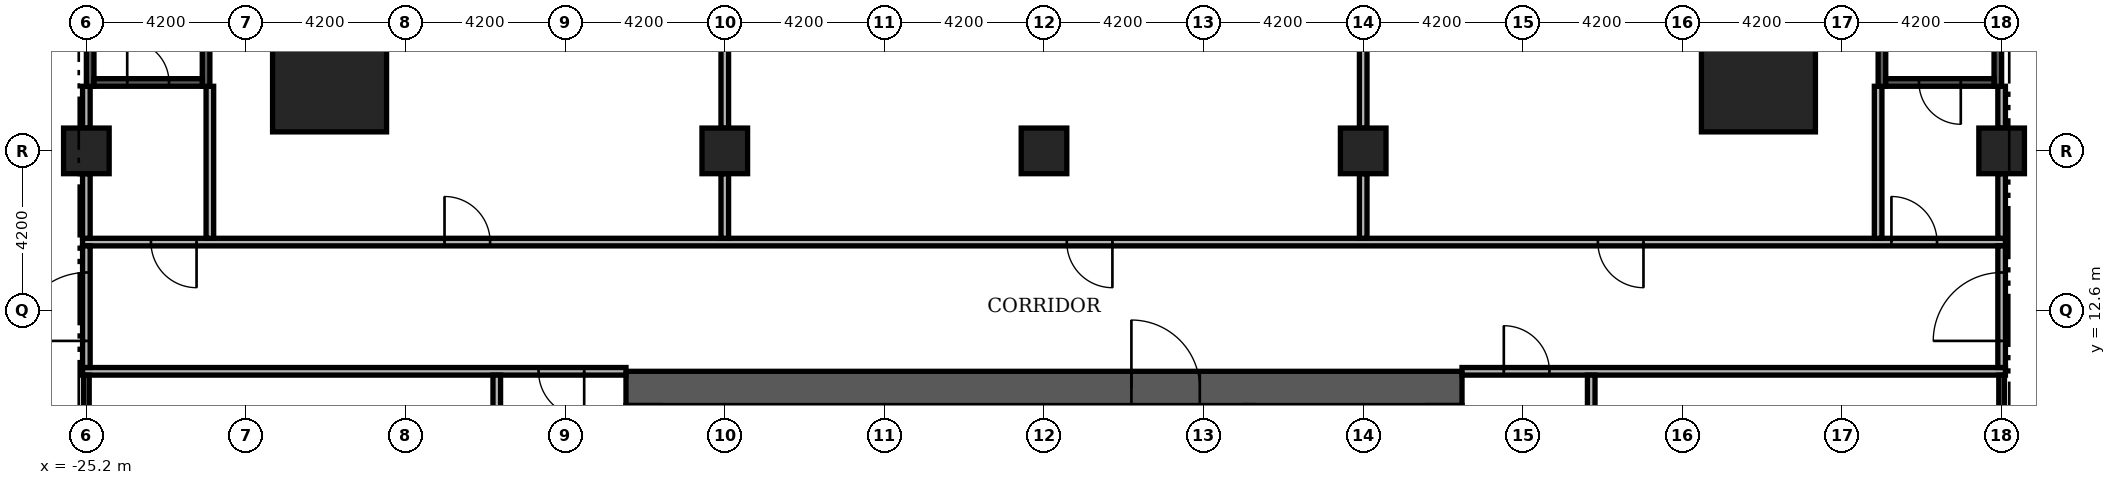
"""IFC4 building model, lengths in metres.
Left out: names, types, materials, properties, quantities, classifications, styles, units other than length and angle.
Written with IfcOpenShell. Run it as: python <this file> out.ifc"""

import sys

from ifc_helpers import new_model, si_unit, direction, frame, frame_2d, origin, origin_2d, place, context, subcontext, project, spatial, rectangle, extrude, element, fill, save


model = new_model("IFC4")
c1 = context("Model", 3, precision=1e-05, world=origin(), true_north=direction((0.0, 1.0)))
c2 = subcontext(c1, "Body", "Model", "MODEL_VIEW")
j1 = project(units=[si_unit("LENGTHUNIT", "METRE"), si_unit("PLANEANGLEUNIT", "RADIAN")], contexts=[c1])
p1 = place(None, origin())
s1 = spatial("IfcSite", under=j1, at=p1, CompositionType="ELEMENT")
p2 = place(p1, origin())
s2 = spatial("IfcBuilding", under=s1, at=p2, CompositionType="ELEMENT")
p3 = place(p2, frame((0.0, 0.0, -8.4)))
s3 = spatial("IfcBuildingStorey", under=s2, at=p3, CompositionType="ELEMENT", Elevation=-8.4)
p4 = place(p3, frame((-11.0, 10.55, 0.0), z_axis=(0.0, 0.0, 1.0), x_axis=(1.0, 0.0, 0.0)))
e1 = element("IfcWall", 1, at=p4, inside=s3, PredefinedType="SHEAR", context=c2, shape_type="SweptSolid", body=[
    extrude(rectangle(XDim=22.0, YDim=0.9, at=frame_2d((11.0, 0.0))), origin(), (0.0, 0.0, 1.0), 3.85),
])
p5 = place(p4, frame((13.3, 0.0, 0.0)))
e2 = element("IfcOpeningElement", 2, at=p5, cuts=e1, PredefinedType="OPENING", context=c2, shape_type="SweptSolid", body=[
    extrude(rectangle(XDim=1.8, YDim=2.2, at=frame_2d((0.9, 1.1))), frame((0.0, 0.46, 0.0), z_axis=(0.0, -1.0, 0.0), x_axis=(1.0, 0.0, 0.0)), (0.0, 0.0, 1.0), 0.92),
])
for number, where, z_axis, x_axis in (
    (3, (18.8, 18.8, 0.0), (0.0, 0.0, 1.0), (1.0, 0.0, 0.0)),
    (4, (-18.8, 18.8, 0.0), (0.0, 0.0, 1.0), (1.0, 0.0, 0.0)),
):
    element("IfcColumn", number, at=place(p3, frame(where, z_axis=z_axis, x_axis=x_axis)), inside=s3, PredefinedType="COLUMN", context=c2, shape_type="SweptSolid", body=[
        extrude(rectangle(XDim=3.0, YDim=3.0, at=origin_2d()), origin(), (0.0, 0.0, 1.0), 4.2),
    ])
for number, where, z_axis, x_axis in (
    (5, (25.2, 16.8, 0.0), (0.0, 0.0, 1.0), (1.0, 0.0, 0.0)),
    (6, (-25.2, 16.8, 0.0), (0.0, 0.0, 1.0), (1.0, 0.0, 0.0)),
    (7, (0.0, 16.8, 0.0), (0.0, 0.0, 1.0), (1.0, 0.0, 0.0)),
    (8, (8.4, 16.8, 0.0), (0.0, 0.0, 1.0), (1.0, 0.0, 0.0)),
    (9, (-8.4, 16.8, 0.0), (0.0, 0.0, 1.0), (1.0, 0.0, 0.0)),
):
    element("IfcColumn", number, at=place(p3, frame(where, z_axis=z_axis, x_axis=x_axis)), inside=s3, PredefinedType="COLUMN", context=c2, shape_type="SweptSolid", body=[
        extrude(rectangle(XDim=1.2, YDim=1.2, at=origin_2d()), origin(), (0.0, 0.0, 1.0), 4.2),
    ])
p6 = place(p3, frame((-25.3, 11.0, 0.0), z_axis=(0.0, 0.0, 1.0), x_axis=(1.0, 0.0, 0.0)))
e10 = element("IfcWall", 10, at=p6, inside=s3, PredefinedType="PARTITIONING", context=c2, shape_type="SweptSolid", body=[
    extrude(rectangle(XDim=14.3, YDim=0.2, at=frame_2d((7.15, 0.0))), origin(), (0.0, 0.0, 1.0), 3.85),
])
p7 = place(p6, frame((12.0, 0.0, 0.0)))
e11 = element("IfcOpeningElement", 11, at=p7, cuts=e10, PredefinedType="OPENING", context=c2, shape_type="SweptSolid", body=[
    extrude(rectangle(XDim=1.2, YDim=2.2, at=frame_2d((0.6, 1.1))), frame((0.0, 0.11, 0.0), z_axis=(0.0, -1.0, 0.0), x_axis=(1.0, 0.0, 0.0)), (0.0, 0.0, 1.0), 0.22),
])
p8 = place(p3, frame((11.0, 11.0, 0.0), z_axis=(0.0, 0.0, 1.0), x_axis=(1.0, 0.0, 0.0)))
e12 = element("IfcWall", 12, at=p8, inside=s3, PredefinedType="PARTITIONING", context=c2, shape_type="SweptSolid", body=[
    extrude(rectangle(XDim=14.3, YDim=0.2, at=frame_2d((7.15, 0.0))), origin(), (0.0, 0.0, 1.0), 3.85),
])
p9 = place(p8, frame((1.1, 0.0, 0.0)))
e13 = element("IfcOpeningElement", 13, at=p9, cuts=e12, PredefinedType="OPENING", context=c2, shape_type="SweptSolid", body=[
    extrude(rectangle(XDim=1.2, YDim=2.2, at=frame_2d((0.6, 1.1))), frame((0.0, 0.11, 0.0), z_axis=(0.0, -1.0, 0.0), x_axis=(1.0, 0.0, 0.0)), (0.0, 0.0, 1.0), 0.22),
])
p10 = place(p3, frame((-25.3, 14.4, 0.0), z_axis=(0.0, 0.0, 1.0), x_axis=(1.0, 0.0, 0.0)))
e14 = element("IfcWall", 14, at=p10, inside=s3, PredefinedType="PARTITIONING", context=c2, shape_type="SweptSolid", body=[
    extrude(rectangle(XDim=50.6, YDim=0.2, at=frame_2d((25.3, 0.0))), origin(), (0.0, 0.0, 1.0), 3.85),
])
p11 = place(p10, frame((1.8, 0.0, 0.0)))
e15 = element("IfcOpeningElement", 15, at=p11, cuts=e14, PredefinedType="OPENING", context=c2, shape_type="SweptSolid", body=[
    extrude(rectangle(XDim=1.2, YDim=2.2, at=frame_2d((0.6, 1.1))), frame((0.0, 0.11, 0.0), z_axis=(0.0, -1.0, 0.0), x_axis=(1.0, 0.0, 0.0)), (0.0, 0.0, 1.0), 0.22),
])
p12 = place(p10, frame((9.525, 0.0, 0.0)))
e16 = element("IfcOpeningElement", 16, at=p12, cuts=e14, PredefinedType="OPENING", context=c2, shape_type="SweptSolid", body=[
    extrude(rectangle(XDim=1.2, YDim=2.2, at=frame_2d((0.6, 1.1))), frame((0.0, 0.11, 0.0), z_axis=(0.0, -1.0, 0.0), x_axis=(1.0, 0.0, 0.0)), (0.0, 0.0, 1.0), 0.22),
])
p13 = place(p10, frame((25.9, 0.0, 0.0)))
e17 = element("IfcOpeningElement", 17, at=p13, cuts=e14, PredefinedType="OPENING", context=c2, shape_type="SweptSolid", body=[
    extrude(rectangle(XDim=1.2, YDim=2.2, at=frame_2d((0.6, 1.1))), frame((0.0, 0.11, 0.0), z_axis=(0.0, -1.0, 0.0), x_axis=(1.0, 0.0, 0.0)), (0.0, 0.0, 1.0), 0.22),
])
p14 = place(p10, frame((39.875, 0.0, 0.0)))
e18 = element("IfcOpeningElement", 18, at=p14, cuts=e14, PredefinedType="OPENING", context=c2, shape_type="SweptSolid", body=[
    extrude(rectangle(XDim=1.2, YDim=2.2, at=frame_2d((0.6, 1.1))), frame((0.0, 0.11, 0.0), z_axis=(0.0, -1.0, 0.0), x_axis=(1.0, 0.0, 0.0)), (0.0, 0.0, 1.0), 0.22),
])
p15 = place(p10, frame((47.6, 0.0, 0.0)))
e19 = element("IfcOpeningElement", 19, at=p15, cuts=e14, PredefinedType="OPENING", context=c2, shape_type="SweptSolid", body=[
    extrude(rectangle(XDim=1.2, YDim=2.2, at=frame_2d((0.6, 1.1))), frame((0.0, 0.11, 0.0), z_axis=(0.0, -1.0, 0.0), x_axis=(1.0, 0.0, 0.0)), (0.0, 0.0, 1.0), 0.22),
])
p16 = place(p3, frame((-25.2, 9.0, 0.0), z_axis=(0.0, 0.0, 1.0), x_axis=(0.0, 1.0, 0.0)))
e20 = element("IfcWall", 20, at=p16, inside=s3, PredefinedType="PARTITIONING", context=c2, shape_type="SweptSolid", body=[
    extrude(rectangle(XDim=1.9, YDim=0.15, at=frame_2d((0.95, 0.0))), origin(), (0.0, 0.0, 1.0), 3.85),
])
p17 = place(p3, frame((-25.2, 11.1, 0.0), z_axis=(0.0, 0.0, 1.0), x_axis=(0.0, 1.0, 0.0)))
e21 = element("IfcWall", 21, at=p17, inside=s3, PredefinedType="PARTITIONING", context=c2, shape_type="SweptSolid", body=[
    extrude(rectangle(XDim=3.2, YDim=0.2, at=frame_2d((1.6, 0.0))), origin(), (0.0, 0.0, 1.0), 3.85),
])
p18 = place(p17, frame((0.7, 0.0, 0.0)))
e22 = element("IfcOpeningElement", 22, at=p18, cuts=e21, PredefinedType="OPENING", context=c2, shape_type="SweptSolid", body=[
    extrude(rectangle(XDim=1.8, YDim=2.2, at=frame_2d((0.9, 1.1))), frame((0.0, 0.11, 0.0), z_axis=(0.0, -1.0, 0.0), x_axis=(1.0, 0.0, 0.0)), (0.0, 0.0, 1.0), 0.22),
])
p19 = place(p3, frame((-25.2, 14.5, 0.0), z_axis=(0.0, 0.0, 1.0), x_axis=(0.0, 1.0, 0.0)))
e23 = element("IfcWall", 23, at=p19, inside=s3, PredefinedType="PARTITIONING", context=c2, shape_type="SweptSolid", body=[
    extrude(rectangle(XDim=1.7, YDim=0.2, at=frame_2d((0.85, 0.0))), origin(), (0.0, 0.0, 1.0), 3.85),
])
p20 = place(p3, frame((-25.2, 17.4, 0.0), z_axis=(0.0, 0.0, 1.0), x_axis=(0.0, 1.0, 0.0)))
e24 = element("IfcWall", 24, at=p20, inside=s3, PredefinedType="PARTITIONING", context=c2, shape_type="SweptSolid", body=[
    extrude(rectangle(XDim=1.1, YDim=0.2, at=frame_2d((0.55, 0.0))), origin(), (0.0, 0.0, 1.0), 3.85),
])
p21 = place(p3, frame((-21.95, 14.5, 0.0), z_axis=(0.0, 0.0, 1.0), x_axis=(0.0, 1.0, 0.0)))
e25 = element("IfcWall", 25, at=p21, inside=s3, PredefinedType="PARTITIONING", context=c2, shape_type="SweptSolid", body=[
    extrude(rectangle(XDim=4.0, YDim=0.2, at=frame_2d((2.0, 0.0))), origin(), (0.0, 0.0, 1.0), 3.85),
])
p22 = place(p3, frame((-14.4, -10.9, 0.0), z_axis=(0.0, 0.0, 1.0), x_axis=(0.0, 1.0, 0.0)))
e26 = element("IfcWall", 26, at=p22, inside=s3, PredefinedType="PARTITIONING", context=c2, shape_type="SweptSolid", body=[
    extrude(rectangle(XDim=21.8, YDim=0.2, at=frame_2d((10.9, 0.0))), origin(), (0.0, 0.0, 1.0), 3.85),
])
p23 = place(p22, frame((4.8, 0.0, 0.0)))
e27 = element("IfcOpeningElement", 27, at=p23, cuts=e26, PredefinedType="OPENING", context=c2, shape_type="SweptSolid", body=[
    extrude(rectangle(XDim=1.2, YDim=2.2, at=frame_2d((0.6, 1.1))), frame((0.0, 0.11, 0.0), z_axis=(0.0, -1.0, 0.0), x_axis=(1.0, 0.0, 0.0)), (0.0, 0.0, 1.0), 0.22),
])
p24 = place(p22, frame((15.8, 0.0, 0.0)))
e28 = element("IfcOpeningElement", 28, at=p24, cuts=e26, PredefinedType="OPENING", context=c2, shape_type="SweptSolid", body=[
    extrude(rectangle(XDim=1.2, YDim=2.2, at=frame_2d((0.6, 1.1))), frame((0.0, 0.11, 0.0), z_axis=(0.0, -1.0, 0.0), x_axis=(1.0, 0.0, 0.0)), (0.0, 0.0, 1.0), 0.22),
])
p25 = place(p3, frame((-8.4, 14.5, 0.0), z_axis=(0.0, 0.0, 1.0), x_axis=(0.0, 1.0, 0.0)))
e29 = element("IfcWall", 29, at=p25, inside=s3, PredefinedType="PARTITIONING", context=c2, shape_type="SweptSolid", body=[
    extrude(rectangle(XDim=1.7, YDim=0.2, at=frame_2d((0.85, 0.0))), origin(), (0.0, 0.0, 1.0), 3.85),
])
p26 = place(p3, frame((-8.4, 17.4, 0.0), z_axis=(0.0, 0.0, 1.0), x_axis=(0.0, 1.0, 0.0)))
e30 = element("IfcWall", 30, at=p26, inside=s3, PredefinedType="PARTITIONING", context=c2, shape_type="SweptSolid", body=[
    extrude(rectangle(XDim=7.2, YDim=0.2, at=frame_2d((3.6, 0.0))), origin(), (0.0, 0.0, 1.0), 3.85),
])
p27 = place(p3, frame((8.4, 14.5, 0.0), z_axis=(0.0, 0.0, 1.0), x_axis=(0.0, 1.0, 0.0)))
e31 = element("IfcWall", 31, at=p27, inside=s3, PredefinedType="PARTITIONING", context=c2, shape_type="SweptSolid", body=[
    extrude(rectangle(XDim=1.7, YDim=0.2, at=frame_2d((0.85, 0.0))), origin(), (0.0, 0.0, 1.0), 3.85),
])
p28 = place(p3, frame((8.4, 17.4, 0.0), z_axis=(0.0, 0.0, 1.0), x_axis=(0.0, 1.0, 0.0)))
e32 = element("IfcWall", 32, at=p28, inside=s3, PredefinedType="PARTITIONING", context=c2, shape_type="SweptSolid", body=[
    extrude(rectangle(XDim=7.2, YDim=0.2, at=frame_2d((3.6, 0.0))), origin(), (0.0, 0.0, 1.0), 3.85),
])
p29 = place(p3, frame((14.4, -10.9, 0.0), z_axis=(0.0, 0.0, 1.0), x_axis=(0.0, 1.0, 0.0)))
e33 = element("IfcWall", 33, at=p29, inside=s3, PredefinedType="PARTITIONING", context=c2, shape_type="SweptSolid", body=[
    extrude(rectangle(XDim=21.8, YDim=0.2, at=frame_2d((10.9, 0.0))), origin(), (0.0, 0.0, 1.0), 3.85),
])
p30 = place(p29, frame((4.8, 0.0, 0.0)))
e34 = element("IfcOpeningElement", 34, at=p30, cuts=e33, PredefinedType="OPENING", context=c2, shape_type="SweptSolid", body=[
    extrude(rectangle(XDim=1.2, YDim=2.2, at=frame_2d((0.6, 1.1))), frame((0.0, 0.11, 0.0), z_axis=(0.0, -1.0, 0.0), x_axis=(1.0, 0.0, 0.0)), (0.0, 0.0, 1.0), 0.22),
])
p31 = place(p29, frame((15.8, 0.0, 0.0)))
e35 = element("IfcOpeningElement", 35, at=p31, cuts=e33, PredefinedType="OPENING", context=c2, shape_type="SweptSolid", body=[
    extrude(rectangle(XDim=1.2, YDim=2.2, at=frame_2d((0.6, 1.1))), frame((0.0, 0.11, 0.0), z_axis=(0.0, -1.0, 0.0), x_axis=(1.0, 0.0, 0.0)), (0.0, 0.0, 1.0), 0.22),
])
p32 = place(p3, frame((21.95, 14.5, 0.0), z_axis=(0.0, 0.0, 1.0), x_axis=(0.0, 1.0, 0.0)))
e36 = element("IfcWall", 36, at=p32, inside=s3, PredefinedType="PARTITIONING", context=c2, shape_type="SweptSolid", body=[
    extrude(rectangle(XDim=4.0, YDim=0.2, at=frame_2d((2.0, 0.0))), origin(), (0.0, 0.0, 1.0), 3.85),
])
p33 = place(p3, frame((25.2, 9.0, 0.0), z_axis=(0.0, 0.0, 1.0), x_axis=(0.0, 1.0, 0.0)))
e37 = element("IfcWall", 37, at=p33, inside=s3, PredefinedType="PARTITIONING", context=c2, shape_type="SweptSolid", body=[
    extrude(rectangle(XDim=1.9, YDim=0.15, at=frame_2d((0.95, 0.0))), origin(), (0.0, 0.0, 1.0), 3.85),
])
p34 = place(p3, frame((25.2, 11.1, 0.0), z_axis=(0.0, 0.0, 1.0), x_axis=(0.0, 1.0, 0.0)))
e38 = element("IfcWall", 38, at=p34, inside=s3, PredefinedType="PARTITIONING", context=c2, shape_type="SweptSolid", body=[
    extrude(rectangle(XDim=3.2, YDim=0.2, at=frame_2d((1.6, 0.0))), origin(), (0.0, 0.0, 1.0), 3.85),
])
p35 = place(p34, frame((0.7, 0.0, 0.0)))
e39 = element("IfcOpeningElement", 39, at=p35, cuts=e38, PredefinedType="OPENING", context=c2, shape_type="SweptSolid", body=[
    extrude(rectangle(XDim=1.8, YDim=2.2, at=frame_2d((0.9, 1.1))), frame((0.0, 0.11, 0.0), z_axis=(0.0, -1.0, 0.0), x_axis=(1.0, 0.0, 0.0)), (0.0, 0.0, 1.0), 0.22),
])
p36 = place(p3, frame((25.2, 14.5, 0.0), z_axis=(0.0, 0.0, 1.0), x_axis=(0.0, 1.0, 0.0)))
e40 = element("IfcWall", 40, at=p36, inside=s3, PredefinedType="PARTITIONING", context=c2, shape_type="SweptSolid", body=[
    extrude(rectangle(XDim=1.7, YDim=0.2, at=frame_2d((0.85, 0.0))), origin(), (0.0, 0.0, 1.0), 3.85),
])
p37 = place(p3, frame((25.2, 17.4, 0.0), z_axis=(0.0, 0.0, 1.0), x_axis=(0.0, 1.0, 0.0)))
e41 = element("IfcWall", 41, at=p37, inside=s3, PredefinedType="PARTITIONING", context=c2, shape_type="SweptSolid", body=[
    extrude(rectangle(XDim=1.1, YDim=0.2, at=frame_2d((0.55, 0.0))), origin(), (0.0, 0.0, 1.0), 3.85),
])
p38 = place(p3, frame((22.05, 18.5, 0.0), z_axis=(0.0, 0.0, 1.0), x_axis=(0.0, 1.0, 0.0)))
e42 = element("IfcWall", 42, at=p38, inside=s3, PredefinedType="SOLIDWALL", context=c2, shape_type="SweptSolid", body=[
    extrude(rectangle(XDim=6.74, YDim=0.2, at=frame_2d((3.37, 0.0))), origin(), (0.0, 0.0, 1.0), 3.85),
])
p39 = place(p3, frame((25.1, 18.5, 0.0), z_axis=(0.0, 0.0, 1.0), x_axis=(0.0, 1.0, 0.0)))
e43 = element("IfcWall", 43, at=p39, inside=s3, PredefinedType="SOLIDWALL", context=c2, shape_type="SweptSolid", body=[
    extrude(rectangle(XDim=6.1, YDim=0.2, at=frame_2d((3.05, 0.0))), origin(), (0.0, 0.0, 1.0), 3.85),
])
p40 = place(p3, frame((22.15, 18.6, 0.0), z_axis=(0.0, 0.0, 1.0), x_axis=(1.0, 0.0, 0.0)))
e44 = element("IfcWall", 44, at=p40, inside=s3, PredefinedType="SOLIDWALL", context=c2, shape_type="SweptSolid", body=[
    extrude(rectangle(XDim=2.85, YDim=0.2, at=frame_2d((1.425, 0.0))), origin(), (0.0, 0.0, 1.0), 3.85),
])
p41 = place(p40, frame((0.875, 0.0, 0.0)))
e45 = element("IfcOpeningElement", 45, at=p41, cuts=e44, PredefinedType="OPENING", context=c2, shape_type="SweptSolid", body=[
    extrude(rectangle(XDim=1.1, YDim=2.2, at=frame_2d((0.55, 1.1))), frame((0.0, 0.11, 0.0), z_axis=(0.0, -1.0, 0.0), x_axis=(1.0, 0.0, 0.0)), (0.0, 0.0, 1.0), 0.22),
])
p42 = place(p3, frame((-25.1, 18.5, 0.0), z_axis=(0.0, 0.0, 1.0), x_axis=(0.0, 1.0, 0.0)))
e46 = element("IfcWall", 46, at=p42, inside=s3, PredefinedType="SOLIDWALL", context=c2, shape_type="SweptSolid", body=[
    extrude(rectangle(XDim=6.1, YDim=0.2, at=frame_2d((3.05, 0.0))), origin(), (0.0, 0.0, 1.0), 3.85),
])
p43 = place(p3, frame((-22.05, 18.5, 0.0), z_axis=(0.0, 0.0, 1.0), x_axis=(0.0, 1.0, 0.0)))
e47 = element("IfcWall", 47, at=p43, inside=s3, PredefinedType="SOLIDWALL", context=c2, shape_type="SweptSolid", body=[
    extrude(rectangle(XDim=6.74, YDim=0.2, at=frame_2d((3.37, 0.0))), origin(), (0.0, 0.0, 1.0), 3.85),
])
p44 = place(p3, frame((-25.0, 18.6, 0.0), z_axis=(0.0, 0.0, 1.0), x_axis=(1.0, 0.0, 0.0)))
e48 = element("IfcWall", 48, at=p44, inside=s3, PredefinedType="SOLIDWALL", context=c2, shape_type="SweptSolid", body=[
    extrude(rectangle(XDim=2.85, YDim=0.2, at=frame_2d((1.425, 0.0))), origin(), (0.0, 0.0, 1.0), 3.85),
])
p45 = place(p44, frame((0.875, 0.0, 0.0)))
e49 = element("IfcOpeningElement", 49, at=p45, cuts=e48, PredefinedType="OPENING", context=c2, shape_type="SweptSolid", body=[
    extrude(rectangle(XDim=1.1, YDim=2.2, at=frame_2d((0.55, 1.1))), frame((0.0, 0.11, 0.0), z_axis=(0.0, -1.0, 0.0), x_axis=(1.0, 0.0, 0.0)), (0.0, 0.0, 1.0), 0.22),
])
p46 = place(p5, origin())
e50 = element("IfcDoor", 50, at=p46, inside=s3, OperationType="DOUBLE_DOOR_SINGLE_SWING", PredefinedType="DOOR", context=c2, shape_type="SweptSolid", body=[
    extrude(rectangle(XDim=1.8, YDim=2.2, at=frame_2d((0.9, 1.1))), frame((0.0, 0.025, 0.0), z_axis=(0.0, -1.0, 0.0), x_axis=(1.0, 0.0, 0.0)), (0.0, 0.0, 1.0), 0.05),
])
fill(e2, e50)
p47 = place(p7, origin())
e51 = element("IfcDoor", 51, at=p47, inside=s3, OperationType="SINGLE_SWING_RIGHT", PredefinedType="DOOR", context=c2, shape_type="SweptSolid", body=[
    extrude(rectangle(XDim=1.2, YDim=2.2, at=frame_2d((0.6, 1.1))), frame((0.0, 0.025, 0.0), z_axis=(0.0, -1.0, 0.0), x_axis=(1.0, 0.0, 0.0)), (0.0, 0.0, 1.0), 0.05),
])
fill(e11, e51)
p48 = place(p9, origin())
e52 = element("IfcDoor", 52, at=p48, inside=s3, OperationType="SINGLE_SWING_LEFT", PredefinedType="DOOR", context=c2, shape_type="SweptSolid", body=[
    extrude(rectangle(XDim=1.2, YDim=2.2, at=frame_2d((0.6, 1.1))), frame((0.0, 0.025, 0.0), z_axis=(0.0, -1.0, 0.0), x_axis=(1.0, 0.0, 0.0)), (0.0, 0.0, 1.0), 0.05),
])
fill(e13, e52)
p49 = place(p18, origin())
e53 = element("IfcDoor", 53, at=p49, inside=s3, OperationType="DOUBLE_DOOR_SINGLE_SWING", PredefinedType="DOOR", context=c2, shape_type="SweptSolid", body=[
    extrude(rectangle(XDim=1.8, YDim=2.2, at=frame_2d((0.9, 1.1))), frame((0.0, 0.025, 0.0), z_axis=(0.0, -1.0, 0.0), x_axis=(1.0, 0.0, 0.0)), (0.0, 0.0, 1.0), 0.05),
])
fill(e22, e53)
p50 = place(p35, origin())
e54 = element("IfcDoor", 54, at=p50, inside=s3, OperationType="DOUBLE_DOOR_SINGLE_SWING", PredefinedType="DOOR", context=c2, shape_type="SweptSolid", body=[
    extrude(rectangle(XDim=1.8, YDim=2.2, at=frame_2d((0.9, 1.1))), frame((0.0, 0.025, 0.0), z_axis=(0.0, -1.0, 0.0), x_axis=(1.0, 0.0, 0.0)), (0.0, 0.0, 1.0), 0.05),
])
fill(e39, e54)
p51 = place(p11, origin())
e55 = element("IfcDoor", 55, at=p51, inside=s3, OperationType="SINGLE_SWING_RIGHT", PredefinedType="DOOR", context=c2, shape_type="SweptSolid", body=[
    extrude(rectangle(XDim=1.2, YDim=2.2, at=frame_2d((0.6, 1.1))), frame((0.0, 0.025, 0.0), z_axis=(0.0, -1.0, 0.0), x_axis=(1.0, 0.0, 0.0)), (0.0, 0.0, 1.0), 0.05),
])
fill(e15, e55)
p52 = place(p12, origin())
e56 = element("IfcDoor", 56, at=p52, inside=s3, OperationType="SINGLE_SWING_LEFT", PredefinedType="DOOR", context=c2, shape_type="SweptSolid", body=[
    extrude(rectangle(XDim=1.2, YDim=2.2, at=frame_2d((0.6, 1.1))), frame((0.0, 0.025, 0.0), z_axis=(0.0, -1.0, 0.0), x_axis=(1.0, 0.0, 0.0)), (0.0, 0.0, 1.0), 0.05),
])
fill(e16, e56)
p53 = place(p13, origin())
e57 = element("IfcDoor", 57, at=p53, inside=s3, OperationType="SINGLE_SWING_RIGHT", PredefinedType="DOOR", context=c2, shape_type="SweptSolid", body=[
    extrude(rectangle(XDim=1.2, YDim=2.2, at=frame_2d((0.6, 1.1))), frame((0.0, 0.025, 0.0), z_axis=(0.0, -1.0, 0.0), x_axis=(1.0, 0.0, 0.0)), (0.0, 0.0, 1.0), 0.05),
])
fill(e17, e57)
p54 = place(p14, origin())
e58 = element("IfcDoor", 58, at=p54, inside=s3, OperationType="SINGLE_SWING_RIGHT", PredefinedType="DOOR", context=c2, shape_type="SweptSolid", body=[
    extrude(rectangle(XDim=1.2, YDim=2.2, at=frame_2d((0.6, 1.1))), frame((0.0, 0.025, 0.0), z_axis=(0.0, -1.0, 0.0), x_axis=(1.0, 0.0, 0.0)), (0.0, 0.0, 1.0), 0.05),
])
fill(e18, e58)
p55 = place(p15, origin())
e59 = element("IfcDoor", 59, at=p55, inside=s3, OperationType="SINGLE_SWING_LEFT", PredefinedType="DOOR", context=c2, shape_type="SweptSolid", body=[
    extrude(rectangle(XDim=1.2, YDim=2.2, at=frame_2d((0.6, 1.1))), frame((0.0, 0.025, 0.0), z_axis=(0.0, -1.0, 0.0), x_axis=(1.0, 0.0, 0.0)), (0.0, 0.0, 1.0), 0.05),
])
fill(e19, e59)
p56 = place(p41, origin())
e60 = element("IfcDoor", 60, at=p56, inside=s3, OperationType="SINGLE_SWING_RIGHT", PredefinedType="DOOR", context=c2, shape_type="SweptSolid", body=[
    extrude(rectangle(XDim=1.1, YDim=2.2, at=frame_2d((0.55, 1.1))), frame((0.0, 0.025, 0.0), z_axis=(0.0, -1.0, 0.0), x_axis=(1.0, 0.0, 0.0)), (0.0, 0.0, 1.0), 0.05),
])
fill(e45, e60)
p57 = place(p45, origin())
e61 = element("IfcDoor", 61, at=p57, inside=s3, OperationType="SINGLE_SWING_LEFT", PredefinedType="DOOR", context=c2, shape_type="SweptSolid", body=[
    extrude(rectangle(XDim=1.1, YDim=2.2, at=frame_2d((0.55, 1.1))), frame((0.0, 0.025, 0.0), z_axis=(0.0, -1.0, 0.0), x_axis=(1.0, 0.0, 0.0)), (0.0, 0.0, 1.0), 0.05),
])
fill(e49, e61)
save(model, sys.argv[1])
